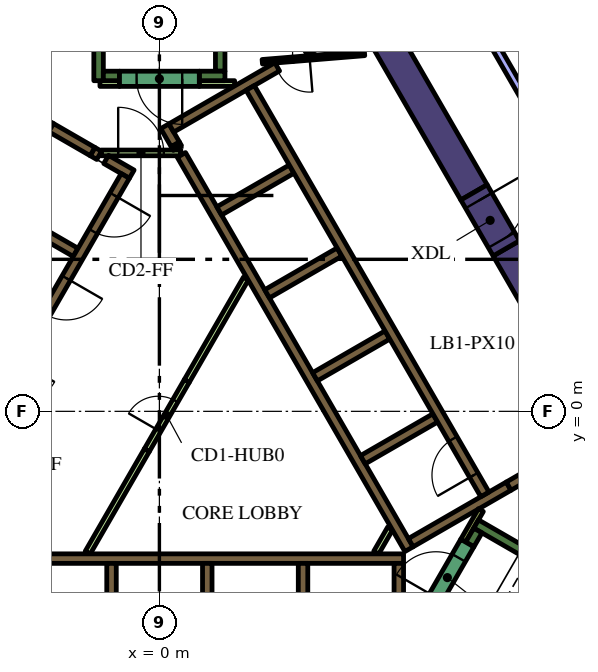
"""IFC4 building model, lengths in metres.
Left out: names, types, materials, properties, quantities, classifications, styles, units other than length and angle.
Written with IfcOpenShell. Run it as: python <this file> out.ifc"""

import sys

from ifc_helpers import new_model, si_unit, direction, frame, frame_2d, origin, place, context, subcontext, project, spatial, rectangle, extrude, element, fill, save


model = new_model("IFC4")
c1 = context("Model", 3, precision=1e-05, world=origin(), true_north=direction((0.0, 1.0)))
c2 = subcontext(c1, "Body", "Model", "MODEL_VIEW")
j1 = project(units=[si_unit("LENGTHUNIT", "METRE"), si_unit("PLANEANGLEUNIT", "RADIAN")], contexts=[c1])
p1 = place(None, origin())
s1 = spatial("IfcSite", under=j1, at=p1, CompositionType="ELEMENT")
p2 = place(p1, origin())
s2 = spatial("IfcBuilding", under=s1, at=p2, CompositionType="ELEMENT")
p3 = place(p2, frame((0.0, 0.0, 162.6)))
s3 = spatial("IfcBuildingStorey", under=s2, at=p3, CompositionType="ELEMENT", Elevation=162.6)
p4 = place(p3, frame((9.129, 4.289, 0.0), z_axis=(0.0, 0.0, 1.0), x_axis=(0.499995742806, -0.866027861663, 0.0)))
e1 = element("IfcWall", 1, at=p4, inside=s3, PredefinedType="SOLIDWALL", context=c2, shape_type="SweptSolid", body=[
    extrude(rectangle(XDim=12.527, YDim=0.8, at=frame_2d((6.264, 0.0))), origin(), (0.0, 0.0, 1.0), 4.2),
])
p5 = place(p3, frame((8.279, 5.761, 0.0), z_axis=(0.0, 0.0, 1.0), x_axis=(-0.500010359015, 0.866019422922, 0.0)))
e2 = element("IfcWall", 2, at=p5, inside=s3, PredefinedType="SOLIDWALL", context=c2, shape_type="SweptSolid", body=[
    extrude(rectangle(XDim=12.528, YDim=0.8, at=frame_2d((6.264, 0.0))), origin(), (0.0, 0.0, 1.0), 4.2),
])
p6 = place(p3, frame((8.334, -2.964, 0.0), z_axis=(0.0, 0.0, 1.0), x_axis=(0.866016039709, -0.500016218704, 0.0)))
e3 = element("IfcWall", 3, at=p6, inside=s3, PredefinedType="SOLIDWALL", context=c2, shape_type="SweptSolid", body=[
    extrude(rectangle(XDim=7.05, YDim=0.25, at=frame_2d((3.525, 0.0))), origin(), (0.0, 0.0, 1.0), 4.2),
])
p7 = place(p3, frame((8.168, -3.503, 0.0), z_axis=(0.0, 0.0, 1.0), x_axis=(0.49972245349, 0.866185586049, 0.0)))
e4 = element("IfcWall", 4, at=p7, inside=s3, PredefinedType="SOLIDWALL", context=c2, shape_type="SweptSolid", body=[
    extrude(rectangle(XDim=0.425, YDim=0.25, at=frame_2d((0.212, 0.0))), origin(), (0.0, 0.0, 1.0), 4.2),
])
p8 = place(p3, frame((1.6, 8.95, 0.0), z_axis=(0.0, 0.0, 1.0), x_axis=(0.0, 1.0, 0.0)))
e5 = element("IfcWall", 5, at=p8, inside=s3, PredefinedType="SOLIDWALL", context=c2, shape_type="SweptSolid", body=[
    extrude(rectangle(XDim=6.8, YDim=0.25, at=frame_2d((3.4, 0.0))), origin(), (0.0, 0.0, 1.0), 4.2),
])
p9 = place(p3, frame((1.05, 8.825, 0.0), z_axis=(0.0, 0.0, 1.0), x_axis=(1.0, 0.0, 0.0)))
e6 = element("IfcWall", 6, at=p9, inside=s3, PredefinedType="SOLIDWALL", context=c2, shape_type="SweptSolid", body=[
    extrude(rectangle(XDim=0.675, YDim=0.25, at=frame_2d((0.337, 0.0))), origin(), (0.0, 0.0, 1.0), 4.2),
])
p10 = place(p3, frame((-1.6, 8.7, 0.0), z_axis=(0.0, 0.0, 1.0), x_axis=(0.0, 1.0, 0.0)))
e7 = element("IfcWall", 7, at=p10, inside=s3, PredefinedType="SOLIDWALL", context=c2, shape_type="SweptSolid", body=[
    extrude(rectangle(XDim=7.05, YDim=0.25, at=frame_2d((3.525, 0.0))), origin(), (0.0, 0.0, 1.0), 4.2),
])
p11 = place(p3, frame((-1.475, 8.825, 0.0), z_axis=(0.0, 0.0, 1.0), x_axis=(1.0, 0.0, 0.0)))
e8 = element("IfcWall", 8, at=p11, inside=s3, PredefinedType="SOLIDWALL", context=c2, shape_type="SweptSolid", body=[
    extrude(rectangle(XDim=0.425, YDim=0.25, at=frame_2d((0.212, 0.0))), origin(), (0.0, 0.0, 1.0), 4.2),
])
p12 = place(p3, frame((-5.545, -3.875, 0.0), z_axis=(0.0, 0.0, 1.0), x_axis=(1.0, 0.0, 0.0)))
e9 = element("IfcWall", 9, at=p12, inside=s3, PredefinedType="SOLIDWALL", context=c2, shape_type="SweptSolid", body=[
    extrude(rectangle(XDim=11.97, YDim=0.25, at=frame_2d((5.985, 0.0))), origin(), (0.0, 0.0, 1.0), 4.2),
])
p13 = place(p3, frame((6.3, -7.24, 0.0), z_axis=(0.0, 0.0, 1.0), x_axis=(0.0, 1.0, 0.0)))
e10 = element("IfcWall", 10, at=p13, inside=s3, PredefinedType="SOLIDWALL", context=c2, shape_type="SweptSolid", body=[
    extrude(rectangle(XDim=3.24, YDim=0.25, at=frame_2d((1.62, 0.0))), origin(), (0.0, 0.0, 1.0), 4.2),
])
for number, where, z_axis, x_axis in (
    (11, (3.78, -4.0, 0.0), (0.0, 0.0, 1.0), (0.0, -1.0, 0.0)),
    (12, (1.26, -4.0, 0.0), (0.0, 0.0, 1.0), (0.0, -1.0, 0.0)),
    (13, (-1.26, -4.0, 0.0), (0.0, 0.0, 1.0), (0.0, -1.0, 0.0)),
):
    element("IfcWall", number, at=place(p3, frame(where, z_axis=z_axis, x_axis=x_axis)), inside=s3, PredefinedType="SOLIDWALL", context=c2, shape_type="SweptSolid", body=[
        extrude(rectangle(XDim=2.2, YDim=0.25, at=frame_2d((1.1, 0.0))), origin(), (0.0, 0.0, 1.0), 4.2),
    ])
p14 = place(p3, frame((0.473, 6.93, 0.0), z_axis=(0.0, 0.0, 1.0), x_axis=(-0.49972245349, 0.866185586049, 0.0)))
e14 = element("IfcWall", 14, at=p14, inside=s3, PredefinedType="SOLIDWALL", context=c2, shape_type="SweptSolid", body=[
    extrude(rectangle(XDim=0.11, YDim=0.25, at=frame_2d((0.055, 0.0))), origin(), (0.0, 0.0, 1.0), 4.2),
])
p15 = place(p3, frame((6.568, -3.627, 0.0), z_axis=(0.0, 0.0, 1.0), x_axis=(-0.499999455981, 0.866025717874, 0.0)))
e15 = element("IfcWall", 15, at=p15, inside=s3, PredefinedType="SOLIDWALL", context=c2, shape_type="SweptSolid", body=[
    extrude(rectangle(XDim=11.978, YDim=0.25, at=frame_2d((5.989, 0.0))), origin(), (0.0, 0.0, 1.0), 4.2),
])
p16 = place(p3, frame((0.417, 7.027, 0.0), z_axis=(0.0, 0.0, 1.0), x_axis=(-0.500210807569, 0.865903659763, 0.0)))
e16 = element("IfcWall", 16, at=p16, inside=s3, PredefinedType="SOLIDWALL", context=c2, shape_type="SweptSolid", body=[
    extrude(rectangle(XDim=0.548, YDim=0.25, at=frame_2d((0.274, 0.0))), origin(), (0.0, 0.0, 1.0), 4.2),
])
p17 = place(p3, frame((3.1, 9.064, 0.0), z_axis=(0.0, 0.0, 1.0), x_axis=(-0.866030133475, -0.499991807846, 0.0)))
e17 = element("IfcWall", 17, at=p17, inside=s3, PredefinedType="SOLIDWALL", context=c2, shape_type="SweptSolid", body=[
    extrude(rectangle(XDim=3.217, YDim=0.25, at=frame_2d((1.608, 0.0))), origin(), (0.0, 0.0, 1.0), 4.2),
])
p18 = place(p3, frame((1.574, 5.274, 0.0), z_axis=(0.0, 0.0, 1.0), x_axis=(0.866028486751, 0.499994660107, 0.0)))
e18 = element("IfcWall", 18, at=p18, inside=s3, PredefinedType="SOLIDWALL", context=c2, shape_type="SweptSolid", body=[
    extrude(rectangle(XDim=2.2, YDim=0.25, at=frame_2d((1.1, 0.0))), origin(), (0.0, 0.0, 1.0), 4.2),
])
for number, where, z_axis, x_axis in (
    (19, (2.834, 3.091, 0.0), (0.0, 0.0, 1.0), (0.866, 0.5, 0.0)),
    (20, (4.094, 0.909, 0.0), (0.0, 0.0, 1.0), (0.866, 0.5, 0.0)),
    (21, (5.354, -1.274, 0.0), (0.0, 0.0, 1.0), (0.866, 0.5, 0.0)),
):
    element("IfcWall", number, at=place(p3, frame(where, z_axis=z_axis, x_axis=x_axis)), inside=s3, PredefinedType="SOLIDWALL", context=c2, shape_type="SweptSolid", body=[
        extrude(rectangle(XDim=2.2, YDim=0.25, at=frame_2d((1.1, 0.0))), origin(), (0.0, 0.0, 1.0), 4.2),
    ])
p19 = place(p3, frame((6.614, -3.456, 0.0), z_axis=(0.0, 0.0, 1.0), x_axis=(0.866032512851, 0.499987686533, 0.0)))
e22 = element("IfcWall", 22, at=p19, inside=s3, PredefinedType="SOLIDWALL", context=c2, shape_type="SweptSolid", body=[
    extrude(rectangle(XDim=2.975, YDim=0.25, at=frame_2d((1.487, 0.0))), origin(), (0.0, 0.0, 1.0), 4.2),
])
p20 = place(p3, frame((3.83, 9.486, 0.0), z_axis=(0.0, 0.0, 1.0), x_axis=(0.865986202621, 0.500067892261, 0.0)))
e23 = element("IfcWall", 23, at=p20, inside=s3, PredefinedType="SOLIDWALL", context=c2, shape_type="SweptSolid", body=[
    extrude(rectangle(XDim=1.591, YDim=0.25, at=frame_2d((0.795, 0.0))), origin(), (0.0, 0.0, 1.0), 4.2),
])
p21 = place(p3, frame((-8.06, -1.311, 0.0), z_axis=(0.0, 0.0, 1.0), x_axis=(0.50000273126, 0.866023826885, 0.0)))
e24 = element("IfcWall", 24, at=p21, inside=s3, PredefinedType="SOLIDWALL", context=c2, shape_type="SweptSolid", body=[
    extrude(rectangle(XDim=10.33, YDim=0.25, at=frame_2d((5.165, 0.0))), origin(), (0.0, 0.0, 1.0), 4.2),
])
p22 = place(p3, frame((-1.758, 6.835, 0.0), z_axis=(0.0, 0.0, 1.0), x_axis=(0.865982457891, -0.500074377092, 0.0)))
e25 = element("IfcWall", 25, at=p22, inside=s3, PredefinedType="SOLIDWALL", context=c2, shape_type="SweptSolid", body=[
    extrude(rectangle(XDim=0.2, YDim=0.25, at=frame_2d((0.1, 0.0))), origin(), (0.0, 0.0, 1.0), 4.2),
])
p23 = place(p3, frame((-1.76, 6.836, 0.0), z_axis=(0.0, 0.0, 1.0), x_axis=(-0.865952863304, 0.500125622755, 0.0)))
e26 = element("IfcWall", 26, at=p23, inside=s3, PredefinedType="SOLIDWALL", context=c2, shape_type="SweptSolid", body=[
    extrude(rectangle(XDim=1.258, YDim=0.25, at=frame_2d((0.629, 0.0))), origin(), (0.0, 0.0, 1.0), 4.2),
])
p24 = place(p3, frame((-0.728, 6.24, 0.0), z_axis=(0.0, 0.0, 1.0), x_axis=(-0.865955664968, 0.500120771724, 0.0)))
e27 = element("IfcWall", 27, at=p24, inside=s3, PredefinedType="SOLIDWALL", context=c2, shape_type="SweptSolid", body=[
    extrude(rectangle(XDim=0.778, YDim=0.25, at=frame_2d((0.389, 0.0))), origin(), (0.0, 0.0, 1.0), 4.2),
])
p25 = place(p3, frame((-2.204, 4.182, 0.0), z_axis=(0.0, 0.0, 1.0), x_axis=(-0.866008176907, 0.50002983664, 0.0)))
e28 = element("IfcWall", 28, at=p25, inside=s3, PredefinedType="SOLIDWALL", context=c2, shape_type="SweptSolid", body=[
    extrude(rectangle(XDim=2.2, YDim=0.25, at=frame_2d((1.1, 0.0))), origin(), (0.0, 0.0, 1.0), 4.2),
])
p26 = place(p3, frame((1.05, 8.625, 0.0), z_axis=(0.0, 0.0, 1.0), x_axis=(1.0, 0.0, 0.0)))
e29 = element("IfcWall", 29, at=p26, inside=s3, PredefinedType="PARTITIONING", context=c2, shape_type="SweptSolid", body=[
    extrude(rectangle(XDim=0.929, YDim=0.15, at=frame_2d((0.464, 0.0))), origin(), (0.0, 0.0, 1.0), 3.15),
])
p27 = place(p3, frame((-1.564, 8.625, 0.0), z_axis=(0.0, 0.0, 1.0), x_axis=(1.0, 0.0, 0.0)))
e30 = element("IfcWall", 30, at=p27, inside=s3, PredefinedType="PARTITIONING", context=c2, shape_type="SweptSolid", body=[
    extrude(rectangle(XDim=0.514, YDim=0.15, at=frame_2d((0.257, 0.0))), origin(), (0.0, 0.0, 1.0), 3.15),
])
p28 = place(p3, frame((8.459, -2.599, 0.0), z_axis=(0.0, 0.0, 1.0), x_axis=(-0.500041054325, -0.866001699761, 0.0)))
e31 = element("IfcWall", 31, at=p28, inside=s3, PredefinedType="PARTITIONING", context=c2, shape_type="SweptSolid", body=[
    extrude(rectangle(XDim=0.929, YDim=0.15, at=frame_2d((0.464, 0.0))), origin(), (0.0, 0.0, 1.0), 4.2),
])
p29 = place(p3, frame((5.705, -3.718, 0.0), z_axis=(0.0, 0.0, 1.0), x_axis=(0.499962090823, 0.866047289552, 0.0)))
e32 = element("IfcWall", 32, at=p29, inside=s3, PredefinedType="PARTITIONING", context=c2, shape_type="SweptSolid", body=[
    extrude(rectangle(XDim=0.735, YDim=0.15, at=frame_2d((0.367, 0.0))), origin(), (0.0, 0.0, 1.0), 3.15),
])
p30 = place(p3, frame((-1.887, -3.718, 0.0), z_axis=(0.0, 0.0, 1.0), x_axis=(0.500043732237, 0.866000153493, 0.0)))
e33 = element("IfcWall", 33, at=p30, inside=s3, PredefinedType="PARTITIONING", context=c2, shape_type="SweptSolid", body=[
    extrude(rectangle(XDim=3.114, YDim=0.15, at=frame_2d((1.557, 0.0))), origin(), (0.0, 0.0, 1.0), 3.15),
])
p31 = place(p3, frame((0.72, 0.797, 0.0), z_axis=(0.0, 0.0, 1.0), x_axis=(0.499984921984, 0.866034108906, 0.0)))
e34 = element("IfcWall", 34, at=p31, inside=s3, PredefinedType="PARTITIONING", context=c2, shape_type="SweptSolid", body=[
    extrude(rectangle(XDim=3.113, YDim=0.15, at=frame_2d((1.557, 0.0))), origin(), (0.0, 0.0, 1.0), 3.15),
])
p32 = place(p3, frame((8.565, -2.185, 0.0), z_axis=(0.0, 0.0, 1.0), x_axis=(-0.499997954832, 0.866026584559, 0.0)))
e35 = element("IfcWall", 35, at=p32, inside=s3, PredefinedType="SOLIDWALL", context=c2, shape_type="SweptSolid", body=[
    extrude(rectangle(XDim=12.35, YDim=0.25, at=frame_2d((6.175, 0.0))), origin(), (0.0, 0.0, 1.0), 4.2),
])
p33 = place(p32, frame((0.585, 0.0, 0.0)))
e36 = element("IfcOpeningElement", 36, at=p33, cuts=e35, PredefinedType="OPENING", context=c2, shape_type="SweptSolid", body=[
    extrude(rectangle(XDim=1.1, YDim=2.1, at=frame_2d((0.55, 1.05))), frame((0.0, 0.135, 0.0), z_axis=(0.0, -1.0, 0.0), x_axis=(1.0, 0.0, 0.0)), (0.0, 0.0, 1.0), 0.27),
])
p34 = place(p3, frame((-0.898, 6.194, 0.0), z_axis=(0.0, 0.0, 1.0), x_axis=(-0.499996202215, -0.866027596426, 0.0)))
e37 = element("IfcWall", 37, at=p34, inside=s3, PredefinedType="SOLIDWALL", context=c2, shape_type="SweptSolid", body=[
    extrude(rectangle(XDim=9.83, YDim=0.25, at=frame_2d((4.915, 0.0))), origin(), (0.0, 0.0, 1.0), 4.2),
])
p35 = place(p34, frame((0.585, 0.0, 0.0)))
e38 = element("IfcOpeningElement", 38, at=p35, cuts=e37, PredefinedType="OPENING", context=c2, shape_type="SweptSolid", body=[
    extrude(rectangle(XDim=1.1, YDim=2.1, at=frame_2d((0.55, 1.05))), frame((0.0, 0.135, 0.0), z_axis=(0.0, -1.0, 0.0), x_axis=(1.0, 0.0, 0.0)), (0.0, 0.0, 1.0), 0.27),
])
p36 = place(p34, frame((3.105, 0.0, 0.0)))
e39 = element("IfcOpeningElement", 39, at=p36, cuts=e37, PredefinedType="OPENING", context=c2, shape_type="SweptSolid", body=[
    extrude(rectangle(XDim=1.1, YDim=2.1, at=frame_2d((0.55, 1.05))), frame((0.0, 0.135, 0.0), z_axis=(0.0, -1.0, 0.0), x_axis=(1.0, 0.0, 0.0)), (0.0, 0.0, 1.0), 0.27),
])
p37 = place(p34, frame((5.625, 0.0, 0.0)))
e40 = element("IfcOpeningElement", 40, at=p37, cuts=e37, PredefinedType="OPENING", context=c2, shape_type="SweptSolid", body=[
    extrude(rectangle(XDim=1.1, YDim=2.1, at=frame_2d((0.55, 1.05))), frame((0.0, 0.135, 0.0), z_axis=(0.0, -1.0, 0.0), x_axis=(1.0, 0.0, 0.0)), (0.0, 0.0, 1.0), 0.27),
])
p38 = place(p34, frame((8.145, 0.0, 0.0)))
e41 = element("IfcOpeningElement", 41, at=p38, cuts=e37, PredefinedType="OPENING", context=c2, shape_type="SweptSolid", body=[
    extrude(rectangle(XDim=1.1, YDim=2.1, at=frame_2d((0.55, 1.05))), frame((0.0, 0.135, 0.0), z_axis=(0.0, -1.0, 0.0), x_axis=(1.0, 0.0, 0.0)), (0.0, 0.0, 1.0), 0.27),
])
p39 = place(p3, frame((7.053, -5.284, 0.0), z_axis=(0.0, 0.0, 1.0), x_axis=(0.500078061341, 0.865980330357, 0.0)))
e42 = element("IfcWall", 42, at=p39, inside=s3, PredefinedType="SOLIDWALL", context=c2, shape_type="SweptSolid", body=[
    extrude(rectangle(XDim=2.1, YDim=0.4, at=frame_2d((1.05, 0.0))), origin(), (0.0, 0.0, 1.0), 4.2),
])
p40 = place(p39, frame((0.45, 0.0, 0.0)))
e43 = element("IfcOpeningElement", 43, at=p40, cuts=e42, PredefinedType="OPENING", context=c2, shape_type="SweptSolid", body=[
    extrude(rectangle(XDim=1.2, YDim=2.1, at=frame_2d((0.6, 1.05))), frame((0.0, 0.21, 0.0), z_axis=(0.0, -1.0, 0.0), x_axis=(1.0, 0.0, 0.0)), (0.0, 0.0, 1.0), 0.42),
])
p41 = place(p3, frame((1.05, 8.75, 0.0), z_axis=(0.0, 0.0, 1.0), x_axis=(-1.0, 0.0, 0.0)))
e44 = element("IfcWall", 44, at=p41, inside=s3, PredefinedType="SOLIDWALL", context=c2, shape_type="SweptSolid", body=[
    extrude(rectangle(XDim=2.1, YDim=0.4, at=frame_2d((1.05, 0.0))), origin(), (0.0, 0.0, 1.0), 4.2),
])
p42 = place(p41, frame((0.45, 0.0, 0.0)))
e45 = element("IfcOpeningElement", 45, at=p42, cuts=e44, PredefinedType="OPENING", context=c2, shape_type="SweptSolid", body=[
    extrude(rectangle(XDim=1.2, YDim=2.1, at=frame_2d((0.6, 1.05))), frame((0.0, 0.21, 0.0), z_axis=(0.0, -1.0, 0.0), x_axis=(1.0, 0.0, 0.0)), (0.0, 0.0, 1.0), 0.42),
])
p43 = place(p3, frame((5.398, 9.419, 0.0), z_axis=(0.0, 0.0, 1.0), x_axis=(-0.996653416376, -0.081743303248, 0.0)))
e46 = element("IfcWall", 46, at=p43, inside=s3, PredefinedType="PARTITIONING", context=c2, shape_type="SweptSolid", body=[
    extrude(rectangle(XDim=2.7, YDim=0.12, at=frame_2d((1.35, 0.0))), origin(), (0.0, 0.0, 1.0), 3.15),
])
p44 = place(p43, frame((1.45, 0.0, 0.0)))
e47 = element("IfcOpeningElement", 47, at=p44, cuts=e46, PredefinedType="OPENING", context=c2, shape_type="SweptSolid", body=[
    extrude(rectangle(XDim=0.9, YDim=2.1, at=frame_2d((0.45, 1.05))), frame((0.0, 0.07, 0.0), z_axis=(0.0, -1.0, 0.0), x_axis=(1.0, 0.0, 0.0)), (0.0, 0.0, 1.0), 0.14),
])
p45 = place(p3, frame((-0.33, -1.022, 0.0), z_axis=(0.0, 0.0, 1.0), x_axis=(0.500027713859, 0.866009402589, 0.0)))
e48 = element("IfcWall", 48, at=p45, inside=s3, PredefinedType="PARTITIONING", context=c2, shape_type="SweptSolid", body=[
    extrude(rectangle(XDim=2.1, YDim=0.15, at=frame_2d((1.05, 0.0))), origin(), (0.0, 0.0, 1.0), 3.15),
])
p46 = place(p45, frame((0.6, 0.0, 0.0)))
e49 = element("IfcOpeningElement", 49, at=p46, cuts=e48, PredefinedType="OPENING", context=c2, shape_type="SweptSolid", body=[
    extrude(rectangle(XDim=0.9, YDim=2.1, at=frame_2d((0.45, 1.05))), frame((0.0, 0.085, 0.0), z_axis=(0.0, -1.0, 0.0), x_axis=(1.0, 0.0, 0.0)), (0.0, 0.0, 1.0), 0.17),
])
p47 = place(p3, frame((-1.534, 6.8, 0.0), z_axis=(0.0, 0.0, 1.0), x_axis=(1.0, 0.0, 0.0)))
e50 = element("IfcWall", 50, at=p47, inside=s3, PredefinedType="PARTITIONING", context=c2, shape_type="SweptSolid", body=[
    extrude(rectangle(XDim=2.1, YDim=0.15, at=frame_2d((1.05, 0.0))), origin(), (0.0, 0.0, 1.0), 3.15),
])
p48 = place(p47, frame((0.45, 0.0, 0.0)))
e51 = element("IfcOpeningElement", 51, at=p48, cuts=e50, PredefinedType="OPENING", context=c2, shape_type="SweptSolid", body=[
    extrude(rectangle(XDim=1.2, YDim=2.1, at=frame_2d((0.6, 1.05))), frame((0.0, 0.085, 0.0), z_axis=(0.0, -1.0, 0.0), x_axis=(1.0, 0.0, 0.0)), (0.0, 0.0, 1.0), 0.17),
])
p49 = place(p3, frame((11.009, -0.919, 0.0), z_axis=(0.0, 0.0, 1.0), x_axis=(-0.866059744384, -0.49994051562, 0.0)))
e52 = element("IfcWall", 52, at=p49, inside=s3, PredefinedType="SOLIDWALL", context=c2, shape_type="SweptSolid", body=[
    extrude(rectangle(XDim=2.1, YDim=0.25, at=frame_2d((1.05, 0.0))), origin(), (0.0, 0.0, 1.0), 4.2),
])
p50 = place(p49, frame((0.45, 0.0, 0.0)))
e53 = element("IfcOpeningElement", 53, at=p50, cuts=e52, PredefinedType="OPENING", context=c2, shape_type="SweptSolid", body=[
    extrude(rectangle(XDim=1.2, YDim=2.1, at=frame_2d((0.6, 1.05))), frame((0.0, 0.135, 0.0), z_axis=(0.0, -1.0, 0.0), x_axis=(1.0, 0.0, 0.0)), (0.0, 0.0, 1.0), 0.27),
])
p51 = place(p3, frame((8.279, 5.761, 0.0), z_axis=(0.0, 0.0, 1.0), x_axis=(0.500062241894, -0.865989465428, 0.0)))
e54 = element("IfcWall", 54, at=p51, inside=s3, PredefinedType="SOLIDWALL", context=c2, shape_type="SweptSolid", body=[
    extrude(rectangle(XDim=1.7, YDim=0.8, at=frame_2d((0.85, 0.0))), origin(), (0.0, 0.0, 1.0), 4.2),
])
p52 = place(p51, frame((0.25, 0.0, 0.0)))
e55 = element("IfcOpeningElement", 55, at=p52, cuts=e54, PredefinedType="OPENING", context=c2, shape_type="SweptSolid", body=[
    extrude(rectangle(XDim=1.2, YDim=2.1, at=frame_2d((0.6, 1.05))), frame((0.0, 0.41, 0.0), z_axis=(0.0, -1.0, 0.0), x_axis=(1.0, 0.0, 0.0)), (0.0, 0.0, 1.0), 0.82),
])
p53 = place(p3, frame((10.732, 6.312, 0.0), z_axis=(0.0, 0.0, 1.0), x_axis=(-0.499984786451, 0.866034187153, 0.0)))
e56 = element("IfcWall", 56, at=p53, inside=s3, PredefinedType="PARTITIONING", context=c2, shape_type="SweptSolid", body=[
    extrude(rectangle(XDim=4.404, YDim=0.2, at=frame_2d((2.202, 0.0))), origin(), (0.0, 0.0, 1.0), 3.15),
])
p54 = place(p33, origin())
e57 = element("IfcDoor", 57, at=p54, inside=s3, OperationType="DOUBLE_DOOR_SLIDING", PredefinedType="DOOR", context=c2, shape_type="SweptSolid", body=[
    extrude(rectangle(XDim=1.1, YDim=2.1, at=frame_2d((0.55, 1.05))), frame((0.0, 0.025, 0.0), z_axis=(0.0, -1.0, 0.0), x_axis=(1.0, 0.0, 0.0)), (0.0, 0.0, 1.0), 0.05),
])
fill(e36, e57)
p55 = place(p35, origin())
e58 = element("IfcDoor", 58, at=p55, inside=s3, OperationType="DOUBLE_DOOR_SLIDING", PredefinedType="DOOR", context=c2, shape_type="SweptSolid", body=[
    extrude(rectangle(XDim=1.1, YDim=2.1, at=frame_2d((0.55, 1.05))), frame((0.0, 0.025, 0.0), z_axis=(0.0, -1.0, 0.0), x_axis=(1.0, 0.0, 0.0)), (0.0, 0.0, 1.0), 0.05),
])
fill(e38, e58)
p56 = place(p36, origin())
e59 = element("IfcDoor", 59, at=p56, inside=s3, OperationType="DOUBLE_DOOR_SLIDING", PredefinedType="DOOR", context=c2, shape_type="SweptSolid", body=[
    extrude(rectangle(XDim=1.1, YDim=2.1, at=frame_2d((0.55, 1.05))), frame((0.0, 0.025, 0.0), z_axis=(0.0, -1.0, 0.0), x_axis=(1.0, 0.0, 0.0)), (0.0, 0.0, 1.0), 0.05),
])
fill(e39, e59)
p57 = place(p40, origin())
e60 = element("IfcDoor", 60, at=p57, inside=s3, OperationType="SINGLE_SWING_LEFT", PredefinedType="DOOR", context=c2, shape_type="SweptSolid", body=[
    extrude(rectangle(XDim=1.2, YDim=2.1, at=frame_2d((0.6, 1.05))), frame((0.0, 0.025, 0.0), z_axis=(0.0, -1.0, 0.0), x_axis=(1.0, 0.0, 0.0)), (0.0, 0.0, 1.0), 0.05),
])
fill(e43, e60)
p58 = place(p42, origin())
e61 = element("IfcDoor", 61, at=p58, inside=s3, OperationType="SINGLE_SWING_LEFT", PredefinedType="DOOR", context=c2, shape_type="SweptSolid", body=[
    extrude(rectangle(XDim=1.2, YDim=2.1, at=frame_2d((0.6, 1.05))), frame((0.0, 0.025, 0.0), z_axis=(0.0, -1.0, 0.0), x_axis=(1.0, 0.0, 0.0)), (0.0, 0.0, 1.0), 0.05),
])
fill(e45, e61)
p59 = place(p44, origin())
e62 = element("IfcDoor", 62, at=p59, inside=s3, OperationType="SINGLE_SWING_LEFT", PredefinedType="DOOR", context=c2, shape_type="SweptSolid", body=[
    extrude(rectangle(XDim=0.9, YDim=2.1, at=frame_2d((0.45, 1.05))), frame((0.0, 0.025, 0.0), z_axis=(0.0, -1.0, 0.0), x_axis=(1.0, 0.0, 0.0)), (0.0, 0.0, 1.0), 0.05),
])
fill(e47, e62)
p60 = place(p46, origin())
e63 = element("IfcDoor", 63, at=p60, inside=s3, OperationType="SINGLE_SWING_LEFT", PredefinedType="DOOR", context=c2, shape_type="SweptSolid", body=[
    extrude(rectangle(XDim=0.9, YDim=2.1, at=frame_2d((0.45, 1.05))), frame((0.0, 0.025, 0.0), z_axis=(0.0, -1.0, 0.0), x_axis=(1.0, 0.0, 0.0)), (0.0, 0.0, 1.0), 0.05),
])
fill(e49, e63)
p61 = place(p48, origin())
e64 = element("IfcDoor", 64, at=p61, inside=s3, OperationType="SINGLE_SWING_LEFT", PredefinedType="DOOR", context=c2, shape_type="SweptSolid", body=[
    extrude(rectangle(XDim=1.2, YDim=2.1, at=frame_2d((0.6, 1.05))), frame((0.0, 0.025, 0.0), z_axis=(0.0, -1.0, 0.0), x_axis=(1.0, 0.0, 0.0)), (0.0, 0.0, 1.0), 0.05),
])
fill(e51, e64)
p62 = place(p52, origin())
e65 = element("IfcDoor", 65, at=p62, inside=s3, OperationType="SINGLE_SWING_LEFT", PredefinedType="DOOR", context=c2, shape_type="SweptSolid", body=[
    extrude(rectangle(XDim=1.2, YDim=2.1, at=frame_2d((0.6, 1.05))), frame((0.0, 0.025, 0.0), z_axis=(0.0, -1.0, 0.0), x_axis=(1.0, 0.0, 0.0)), (0.0, 0.0, 1.0), 0.05),
])
fill(e55, e65)
save(model, sys.argv[1])
